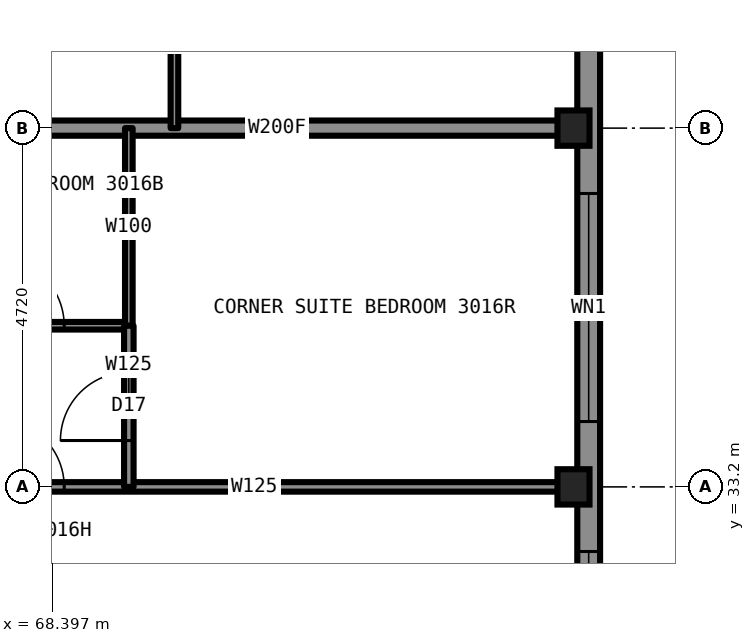
"""IFC4 building model, lengths in metres.
Left out: names, types, materials, properties, quantities, classifications, styles, units other than length and angle.
Written with IfcOpenShell. Run it as: python <this file> out.ifc"""

import sys

from ifc_helpers import new_model, si_unit, direction, frame, frame_2d, origin, origin_2d, place, context, subcontext, project, spatial, rectangle, i_section, extrude, element, fill, save


model = new_model("IFC4")
c1 = context("Model", 3, precision=1e-05, world=origin(), true_north=direction((0.0, 1.0)))
c2 = subcontext(c1, "Body", "Model", "MODEL_VIEW")
j1 = project(units=[si_unit("LENGTHUNIT", "METRE"), si_unit("PLANEANGLEUNIT", "RADIAN")], contexts=[c1])
p1 = place(None, origin())
s1 = spatial("IfcSite", under=j1, at=p1, CompositionType="ELEMENT")
p2 = place(p1, origin())
s2 = spatial("IfcBuilding", under=s1, at=p2, CompositionType="ELEMENT")
p3 = place(p2, frame((0.0, 0.0, 114.4)))
s3 = spatial("IfcBuildingStorey", under=s2, at=p3, CompositionType="ELEMENT", Elevation=114.4)
for number, where, z_axis, x_axis in (
    (1, (75.25, 33.2, 0.0), (0.0, 0.0, 1.0), (1.0, 0.0, 0.0)),
    (2, (75.25, 37.92, 0.0), (0.0, 0.0, 1.0), (1.0, 0.0, 0.0)),
):
    element("IfcColumn", number, at=place(p3, frame(where, z_axis=z_axis, x_axis=x_axis)), inside=s3, PredefinedType="COLUMN", context=c2, shape_type="SweptSolid", body=[
        extrude(i_section(OverallWidth=0.422, OverallDepth=0.465, WebThickness=0.045, FlangeThickness=0.073, at=origin_2d()), origin(), (0.0, 0.0, 1.0), 3.5),
    ])
p4 = place(p3, frame((66.8, 33.2, 0.0), z_axis=(0.0, 0.0, 1.0), x_axis=(1.0, 0.0, 0.0)))
e3 = element("IfcWall", 3, at=p4, inside=s3, PredefinedType="PARTITIONING", context=c2, shape_type="SweptSolid", body=[
    extrude(rectangle(XDim=8.5, YDim=0.125, at=frame_2d((4.25, 0.0))), origin(), (0.0, 0.0, 1.0), 2.573),
])
p5 = place(p4, frame((0.85, 0.0, 0.0)))
e4 = element("IfcOpeningElement", 4, at=p5, cuts=e3, PredefinedType="OPENING", context=c2, shape_type="SweptSolid", body=[
    extrude(rectangle(XDim=0.9, YDim=2.2, at=frame_2d((0.45, 1.1))), frame((0.0, 0.073, 0.0), z_axis=(0.0, -1.0, 0.0), x_axis=(1.0, 0.0, 0.0)), (0.0, 0.0, 1.0), 0.145),
])
p6 = place(p3, frame((67.4, 37.92, 0.0), z_axis=(0.0, 0.0, 1.0), x_axis=(1.0, 0.0, 0.0)))
e5 = element("IfcWall", 5, at=p6, inside=s3, PredefinedType="PARTITIONING", context=c2, shape_type="SweptSolid", body=[
    extrude(rectangle(XDim=7.9, YDim=0.2, at=frame_2d((3.95, 0.0))), origin(), (0.0, 0.0, 1.0), 2.573),
])
p7 = place(p3, frame((66.8, 35.32, 0.0), z_axis=(0.0, 0.0, 1.0), x_axis=(1.0, 0.0, 0.0)))
e6 = element("IfcWall", 6, at=p7, inside=s3, PredefinedType="PARTITIONING", context=c2, shape_type="SweptSolid", body=[
    extrude(rectangle(XDim=2.6, YDim=0.1, at=frame_2d((1.3, 0.0))), origin(), (0.0, 0.0, 1.0), 3.33),
])
p8 = place(p7, frame((0.85, 0.0, 0.0)))
e7 = element("IfcOpeningElement", 7, at=p8, cuts=e6, PredefinedType="OPENING", context=c2, shape_type="SweptSolid", body=[
    extrude(rectangle(XDim=0.9, YDim=2.1, at=frame_2d((0.45, 1.05))), frame((0.0, 0.06, 0.0), z_axis=(0.0, -1.0, 0.0), x_axis=(1.0, 0.0, 0.0)), (0.0, 0.0, 1.0), 0.12),
])
p9 = place(p3, frame((69.4, 35.32, 0.0), z_axis=(0.0, 0.0, 1.0), x_axis=(0.0, 1.0, 0.0)))
e8 = element("IfcWall", 8, at=p9, inside=s3, PredefinedType="PARTITIONING", context=c2, shape_type="SweptSolid", body=[
    extrude(rectangle(XDim=2.6, YDim=0.1, at=frame_2d((1.3, 0.0))), origin(), (0.0, 0.0, 1.0), 3.33),
])
p10 = place(p3, frame((69.4, 33.2, 0.0), z_axis=(0.0, 0.0, 1.0), x_axis=(0.0, 1.0, 0.0)))
e9 = element("IfcWall", 9, at=p10, inside=s3, PredefinedType="PARTITIONING", context=c2, shape_type="SweptSolid", body=[
    extrude(rectangle(XDim=2.12, YDim=0.125, at=frame_2d((1.06, 0.0))), origin(), (0.0, 0.0, 1.0), 3.33),
])
p11 = place(p10, frame((0.61, 0.0, 0.0)))
e10 = element("IfcOpeningElement", 10, at=p11, cuts=e9, PredefinedType="OPENING", context=c2, shape_type="SweptSolid", body=[
    extrude(rectangle(XDim=0.9, YDim=2.2, at=frame_2d((0.45, 1.1))), frame((0.0, 0.073, 0.0), z_axis=(0.0, -1.0, 0.0), x_axis=(1.0, 0.0, 0.0)), (0.0, 0.0, 1.0), 0.145),
])
p12 = place(p3, frame((70.0, 37.92, 0.0), z_axis=(0.0, 0.0, 1.0), x_axis=(0.0, 1.0, 0.0)))
e11 = element("IfcWall", 11, at=p12, inside=s3, PredefinedType="PARTITIONING", context=c2, shape_type="SweptSolid", body=[
    extrude(rectangle(XDim=2.3, YDim=0.1, at=frame_2d((1.15, 0.0))), origin(), (0.0, 0.0, 1.0), 3.33),
])
p13 = place(p3, frame((75.45, 29.9, 0.0), z_axis=(0.0, 0.0, 1.0), x_axis=(0.0, 1.0, 0.0)))
e12 = element("IfcWall", 12, at=p13, inside=s3, PredefinedType="SOLIDWALL", context=c2, shape_type="SweptSolid", body=[
    extrude(rectangle(XDim=30.2, YDim=0.3, at=frame_2d((15.1, 0.0))), origin(), (0.0, 0.0, 1.0), 2.83),
])
p14 = place(p13, frame((0.85, 0.0, 0.5)))
e13 = element("IfcOpeningElement", 13, at=p14, cuts=e12, PredefinedType="OPENING", context=c2, shape_type="SweptSolid", body=[
    extrude(rectangle(XDim=1.6, YDim=2.0, at=frame_2d((0.8, 1.0))), frame((0.0, 0.16, 0.0), z_axis=(0.0, -1.0, 0.0), x_axis=(1.0, 0.0, 0.0)), (0.0, 0.0, 1.0), 0.32),
])
p15 = place(p13, frame((4.16, 0.0, 0.5)))
e14 = element("IfcOpeningElement", 14, at=p15, cuts=e12, PredefinedType="OPENING", context=c2, shape_type="SweptSolid", body=[
    extrude(rectangle(XDim=3.0, YDim=2.0, at=frame_2d((1.5, 1.0))), frame((0.0, 0.16, 0.0), z_axis=(0.0, -1.0, 0.0), x_axis=(1.0, 0.0, 0.0)), (0.0, 0.0, 1.0), 0.32),
])
p16 = place(p13, frame((10.53, 0.0, 0.5)))
e15 = element("IfcOpeningElement", 15, at=p16, cuts=e12, PredefinedType="OPENING", context=c2, shape_type="SweptSolid", body=[
    extrude(rectangle(XDim=1.3, YDim=1.9, at=frame_2d((0.65, 0.95))), frame((0.0, 0.16, 0.0), z_axis=(0.0, -1.0, 0.0), x_axis=(1.0, 0.0, 0.0)), (0.0, 0.0, 1.0), 0.32),
])
p17 = place(p13, frame((13.6, 0.0, 0.5)))
e16 = element("IfcOpeningElement", 16, at=p17, cuts=e12, PredefinedType="OPENING", context=c2, shape_type="SweptSolid", body=[
    extrude(rectangle(XDim=3.0, YDim=2.0, at=frame_2d((1.5, 1.0))), frame((0.0, 0.16, 0.0), z_axis=(0.0, -1.0, 0.0), x_axis=(1.0, 0.0, 0.0)), (0.0, 0.0, 1.0), 0.32),
])
p18 = place(p13, frame((18.32, 0.0, 0.5)))
e17 = element("IfcOpeningElement", 17, at=p18, cuts=e12, PredefinedType="OPENING", context=c2, shape_type="SweptSolid", body=[
    extrude(rectangle(XDim=1.3, YDim=1.9, at=frame_2d((0.65, 0.95))), frame((0.0, 0.16, 0.0), z_axis=(0.0, -1.0, 0.0), x_axis=(1.0, 0.0, 0.0)), (0.0, 0.0, 1.0), 0.32),
])
p19 = place(p13, frame((23.04, 0.0, 0.5)))
e18 = element("IfcOpeningElement", 18, at=p19, cuts=e12, PredefinedType="OPENING", context=c2, shape_type="SweptSolid", body=[
    extrude(rectangle(XDim=3.0, YDim=2.0, at=frame_2d((1.5, 1.0))), frame((0.0, 0.16, 0.0), z_axis=(0.0, -1.0, 0.0), x_axis=(1.0, 0.0, 0.0)), (0.0, 0.0, 1.0), 0.32),
])
p20 = place(p13, frame((27.75, 0.0, 0.5)))
e19 = element("IfcOpeningElement", 19, at=p20, cuts=e12, PredefinedType="OPENING", context=c2, shape_type="SweptSolid", body=[
    extrude(rectangle(XDim=1.6, YDim=2.0, at=frame_2d((0.8, 1.0))), frame((0.0, 0.16, 0.0), z_axis=(0.0, -1.0, 0.0), x_axis=(1.0, 0.0, 0.0)), (0.0, 0.0, 1.0), 0.32),
])
p21 = place(p13, frame((9.88, 0.0, 0.5)))
e20 = element("IfcOpeningElement", 20, at=p21, cuts=e12, PredefinedType="OPENING", context=c2, shape_type="SweptSolid", body=[
    extrude(rectangle(XDim=0.6, YDim=0.9, at=frame_2d((0.3, 0.45))), frame((0.0, 0.16, 0.0), z_axis=(0.0, -1.0, 0.0), x_axis=(1.0, 0.0, 0.0)), (0.0, 0.0, 1.0), 0.32),
])
p22 = place(p13, frame((19.67, 0.0, 0.5)))
e21 = element("IfcOpeningElement", 21, at=p22, cuts=e12, PredefinedType="OPENING", context=c2, shape_type="SweptSolid", body=[
    extrude(rectangle(XDim=0.6, YDim=0.9, at=frame_2d((0.3, 0.45))), frame((0.0, 0.16, 0.0), z_axis=(0.0, -1.0, 0.0), x_axis=(1.0, 0.0, 0.0)), (0.0, 0.0, 1.0), 0.32),
])
p23 = place(p5, origin())
e22 = element("IfcDoor", 22, at=p23, inside=s3, OperationType="SINGLE_SWING_LEFT", PredefinedType="DOOR", context=c2, shape_type="SweptSolid", body=[
    extrude(rectangle(XDim=0.9, YDim=2.2, at=frame_2d((0.45, 1.1))), frame((0.0, 0.025, 0.0), z_axis=(0.0, -1.0, 0.0), x_axis=(1.0, 0.0, 0.0)), (0.0, 0.0, 1.0), 0.05),
])
fill(e4, e22)
p24 = place(p8, origin())
e23 = element("IfcDoor", 23, at=p24, inside=s3, OperationType="SINGLE_SWING_RIGHT", PredefinedType="DOOR", context=c2, shape_type="SweptSolid", body=[
    extrude(rectangle(XDim=0.9, YDim=2.1, at=frame_2d((0.45, 1.05))), frame((0.0, 0.025, 0.0), z_axis=(0.0, -1.0, 0.0), x_axis=(1.0, 0.0, 0.0)), (0.0, 0.0, 1.0), 0.05),
])
fill(e7, e23)
p25 = place(p11, origin())
e24 = element("IfcDoor", 24, at=p25, inside=s3, OperationType="SINGLE_SWING_LEFT", PredefinedType="DOOR", context=c2, shape_type="SweptSolid", body=[
    extrude(rectangle(XDim=0.9, YDim=2.2, at=frame_2d((0.45, 1.1))), frame((0.0, 0.025, 0.0), z_axis=(0.0, -1.0, 0.0), x_axis=(1.0, 0.0, 0.0)), (0.0, 0.0, 1.0), 0.05),
])
fill(e10, e24)
p26 = place(p14, origin())
e25 = element("IfcWindow", 25, at=p26, inside=s3, PartitioningType="SINGLE_PANEL", PredefinedType="WINDOW", context=c2, shape_type="SweptSolid", body=[
    extrude(rectangle(XDim=1.6, YDim=2.0, at=frame_2d((0.8, 1.0))), frame((0.0, 0.03, 0.0), z_axis=(0.0, -1.0, 0.0), x_axis=(1.0, 0.0, 0.0)), (0.0, 0.0, 1.0), 0.06),
])
fill(e13, e25)
p27 = place(p15, origin())
e26 = element("IfcWindow", 26, at=p27, inside=s3, PartitioningType="SINGLE_PANEL", PredefinedType="WINDOW", context=c2, shape_type="SweptSolid", body=[
    extrude(rectangle(XDim=3.0, YDim=2.0, at=frame_2d((1.5, 1.0))), frame((0.0, 0.03, 0.0), z_axis=(0.0, -1.0, 0.0), x_axis=(1.0, 0.0, 0.0)), (0.0, 0.0, 1.0), 0.06),
])
fill(e14, e26)
save(model, sys.argv[1])
